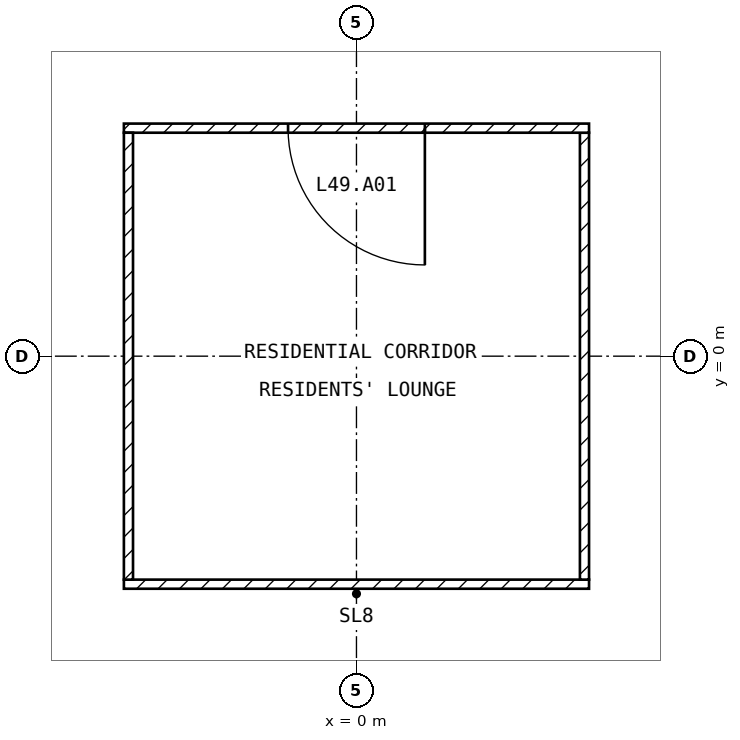
"""IFC4 building model, lengths in metres.
Left out: names, types, materials, properties, quantities, classifications, styles, units other than length and angle.
Written with IfcOpenShell. Run it as: python <this file> out.ifc"""

import sys

from ifc_helpers import new_model, si_unit, direction, frame, frame_2d, origin, place, context, subcontext, project, spatial, rectangle, extrude, element, fill, save


model = new_model("IFC4")
c1 = context("Model", 3, precision=1e-05, world=origin(), true_north=direction((0.0, 1.0)))
c2 = subcontext(c1, "Body", "Model", "MODEL_VIEW")
j1 = project(units=[si_unit("LENGTHUNIT", "METRE"), si_unit("PLANEANGLEUNIT", "RADIAN")], contexts=[c1])
p1 = place(None, origin())
s1 = spatial("IfcSite", under=j1, at=p1, CompositionType="ELEMENT")
p2 = place(p1, origin())
s2 = spatial("IfcBuilding", under=s1, at=p2, CompositionType="ELEMENT")
p3 = place(p2, frame((0.0, 0.0, 198.1)))
s3 = spatial("IfcBuildingStorey", under=s2, at=p3, CompositionType="ELEMENT", Elevation=198.1)
p4 = place(p3, frame((-3.06, -3.0, 0.0), z_axis=(0.0, 0.0, 1.0), x_axis=(1.0, 0.0, 0.0)))
e1 = element("IfcWall", 1, at=p4, inside=s3, PredefinedType="PARTITIONING", context=c2, shape_type="SweptSolid", body=[
    extrude(rectangle(XDim=6.12, YDim=0.12, at=frame_2d((3.06, 0.0))), origin(), (0.0, 0.0, 1.0), 3.25),
])
p5 = place(p3, frame((3.0, -2.94, 0.0), z_axis=(0.0, 0.0, 1.0), x_axis=(0.0, 1.0, 0.0)))
e2 = element("IfcWall", 2, at=p5, inside=s3, PredefinedType="PARTITIONING", context=c2, shape_type="SweptSolid", body=[
    extrude(rectangle(XDim=5.88, YDim=0.12, at=frame_2d((2.94, 0.0))), origin(), (0.0, 0.0, 1.0), 3.25),
])
p6 = place(p3, frame((3.06, 3.0, 0.0), z_axis=(0.0, 0.0, 1.0), x_axis=(-1.0, 0.0, 0.0)))
e3 = element("IfcWall", 3, at=p6, inside=s3, PredefinedType="PARTITIONING", context=c2, shape_type="SweptSolid", body=[
    extrude(rectangle(XDim=6.12, YDim=0.12, at=frame_2d((3.06, 0.0))), origin(), (0.0, 0.0, 1.0), 3.25),
])
p7 = place(p6, frame((2.16, 0.0, 0.0)))
e4 = element("IfcOpeningElement", 4, at=p7, cuts=e3, PredefinedType="OPENING", context=c2, shape_type="SweptSolid", body=[
    extrude(rectangle(XDim=1.8, YDim=2.1, at=frame_2d((0.9, 1.05))), frame((0.0, 0.07, 0.0), z_axis=(0.0, -1.0, 0.0), x_axis=(1.0, 0.0, 0.0)), (0.0, 0.0, 1.0), 0.14),
])
p8 = place(p3, frame((-3.0, 2.94, 0.0), z_axis=(0.0, 0.0, 1.0), x_axis=(0.0, -1.0, 0.0)))
e5 = element("IfcWall", 5, at=p8, inside=s3, PredefinedType="PARTITIONING", context=c2, shape_type="SweptSolid", body=[
    extrude(rectangle(XDim=5.88, YDim=0.12, at=frame_2d((2.94, 0.0))), origin(), (0.0, 0.0, 1.0), 3.25),
])
p9 = place(p7, origin())
e6 = element("IfcDoor", 6, at=p9, inside=s3, OperationType="SINGLE_SWING_LEFT", PredefinedType="DOOR", context=c2, shape_type="SweptSolid", body=[
    extrude(rectangle(XDim=1.8, YDim=2.1, at=frame_2d((0.9, 1.05))), frame((0.0, 0.025, 0.0), z_axis=(0.0, -1.0, 0.0), x_axis=(1.0, 0.0, 0.0)), (0.0, 0.0, 1.0), 0.05),
])
fill(e4, e6)
save(model, sys.argv[1])
